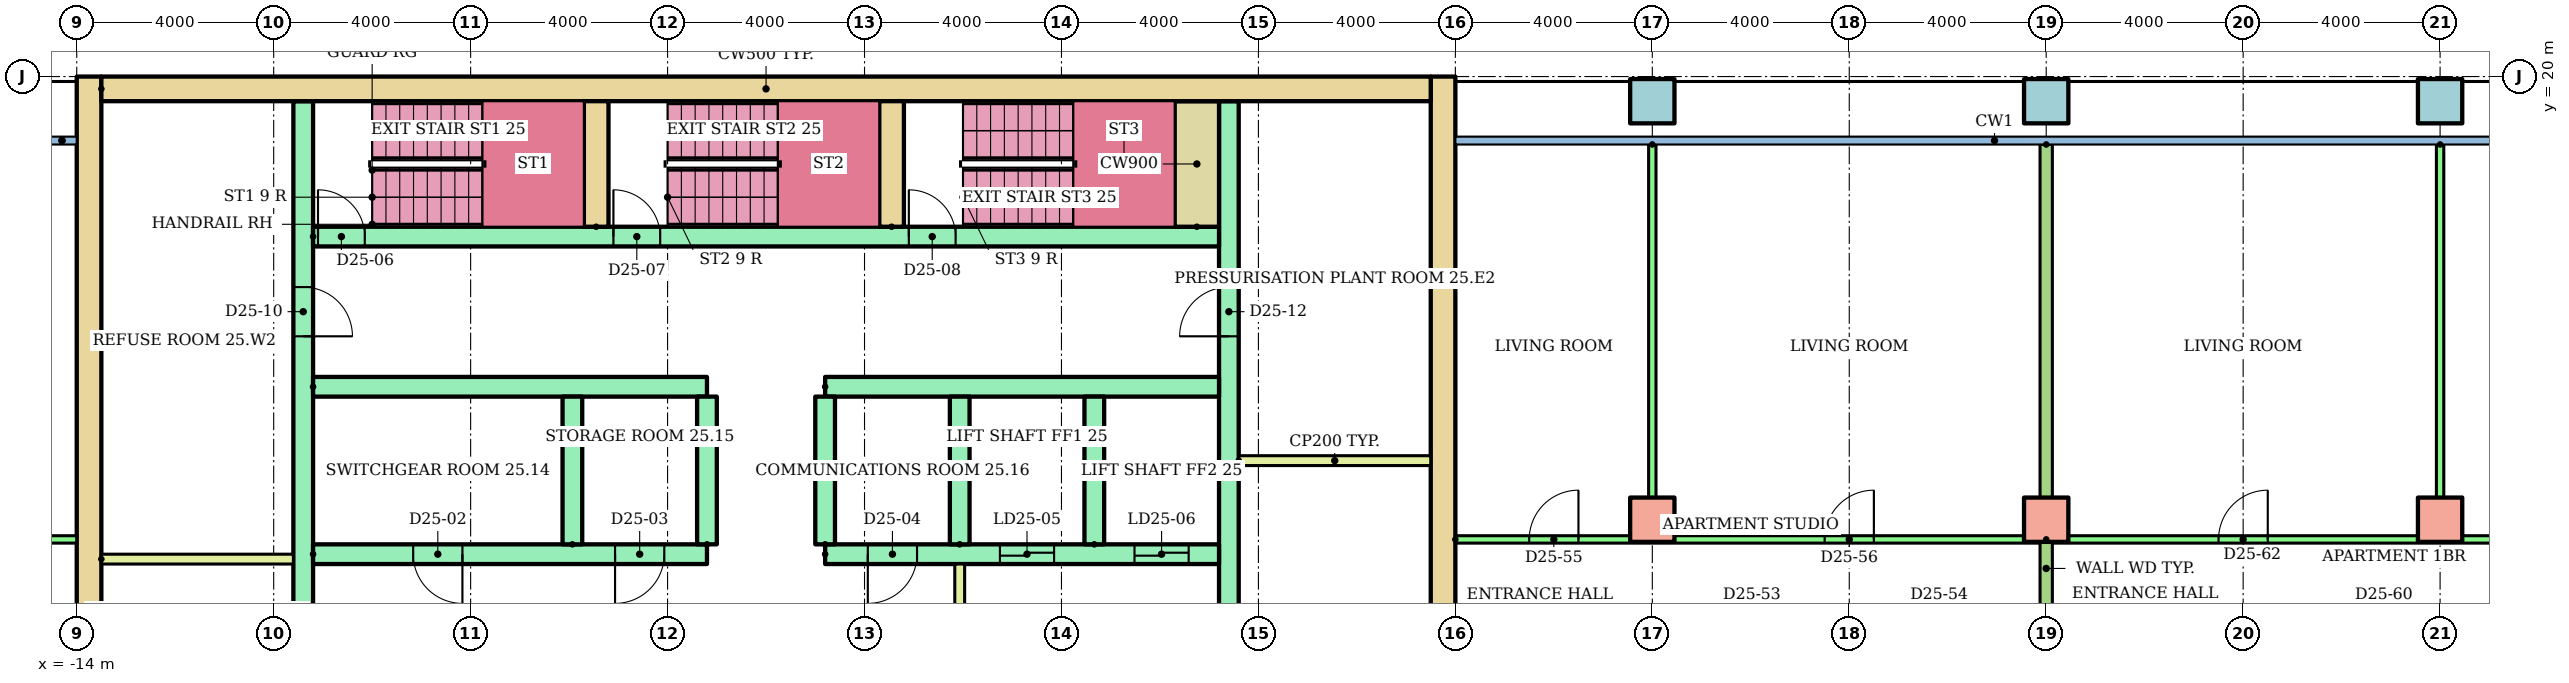
"""IFC4 building model, lengths in metres.
Left out: names, types, materials, properties, quantities, classifications, styles, units other than length and angle.
Written with IfcOpenShell. Run it as: python <this file> out.ifc"""

import sys

from ifc_helpers import new_model, si_unit, direction, frame, frame_2d, origin, origin_2d, place, context, subcontext, project, spatial, rectangle, hollow_rectangle, extrude, element, fill, save


model = new_model("IFC4")
c1 = context("Model", 3, precision=1e-05, world=origin(), true_north=direction((0.0, 1.0)))
c2 = subcontext(c1, "Body", "Model", "MODEL_VIEW")
j1 = project(units=[si_unit("LENGTHUNIT", "METRE"), si_unit("PLANEANGLEUNIT", "RADIAN")], contexts=[c1])
p1 = place(None, origin())
s1 = spatial("IfcSite", under=j1, at=p1, CompositionType="ELEMENT")
p2 = place(p1, origin())
s2 = spatial("IfcBuilding", under=s1, at=p2, CompositionType="ELEMENT")
p3 = place(p2, frame((0.0, 0.0, 96.7)))
s3 = spatial("IfcBuildingStorey", under=s2, at=p3, CompositionType="ELEMENT", Elevation=96.7)
for number, where in (
    (1, (18.0, 11.0, 0.0)),
    (2, (26.0, 11.0, 0.0)),
    (3, (34.0, 11.0, 0.0)),
):
    element("IfcColumn", number, at=place(p3, frame(where)), inside=s3, PredefinedType="COLUMN", context=c2, shape_type="SweptSolid", body=[
        extrude(rectangle(XDim=0.9, YDim=0.9, at=origin_2d()), origin(), (0.0, 0.0, 1.0), 3.2),
    ])
for number, where in (
    (4, (18.0, 19.5, 0.0)),
    (5, (26.0, 19.5, 0.0)),
    (6, (34.0, 19.5, 0.0)),
):
    element("IfcColumn", number, at=place(p3, frame(where)), inside=s3, PredefinedType="COLUMN", context=c2, shape_type="SweptSolid", body=[
        extrude(hollow_rectangle(XDim=0.9, YDim=0.9, WallThickness=0.045, at=origin_2d()), origin(), (0.0, 0.0, 1.0), 3.2),
    ])
for number, where, z_axis, x_axis in (
    (7, (-13.75, 3.0, 0.0), (0.0, 0.0, 1.0), (0.0, 1.0, 0.0)),
    (8, (13.75, 3.0, 0.0), (0.0, 0.0, 1.0), (0.0, 1.0, 0.0)),
):
    element("IfcWall", number, at=place(p3, frame(where, z_axis=z_axis, x_axis=x_axis)), inside=s3, PredefinedType="SHEAR", context=c2, shape_type="SweptSolid", body=[
        extrude(rectangle(XDim=17.0, YDim=0.5, at=frame_2d((8.5, 0.0))), origin(), (0.0, 0.0, 1.0), 2.92),
    ])
p4 = place(p3, frame((-13.5, 19.75, 0.0)))
e9 = element("IfcWall", 9, at=p4, inside=s3, PredefinedType="SHEAR", context=c2, shape_type="SweptSolid", body=[
    extrude(rectangle(XDim=27.0, YDim=0.5, at=frame_2d((13.5, 0.0))), origin(), (0.0, 0.0, 1.0), 2.92),
])
p5 = place(p3, frame((-9.4, 6.8, 0.0), z_axis=(0.0, 0.0, 1.0), x_axis=(0.0, 1.0, 0.0)))
e10 = element("IfcWall", 10, at=p5, inside=s3, PredefinedType="SHEAR", context=c2, shape_type="SweptSolid", body=[
    extrude(rectangle(XDim=12.7, YDim=0.4, at=frame_2d((6.35, 0.0))), origin(), (0.0, 0.0, 1.0), 2.92),
])
p6 = place(p5, frame((1.15, 0.0, 0.0)))
e11 = element("IfcOpeningElement", 11, at=p6, cuts=e10, PredefinedType="OPENING", context=c2, shape_type="SweptSolid", body=[
    extrude(rectangle(XDim=1.0, YDim=2.1, at=frame_2d((0.5, 1.05))), frame((0.0, 0.21, 0.0), z_axis=(0.0, -1.0, 0.0), x_axis=(1.0, 0.0, 0.0)), (0.0, 0.0, 1.0), 0.42),
])
p7 = place(p5, frame((7.925, 0.0, 0.0)))
e12 = element("IfcOpeningElement", 12, at=p7, cuts=e10, PredefinedType="OPENING", context=c2, shape_type="SweptSolid", body=[
    extrude(rectangle(XDim=1.0, YDim=2.1, at=frame_2d((0.5, 1.05))), frame((0.0, 0.21, 0.0), z_axis=(0.0, -1.0, 0.0), x_axis=(1.0, 0.0, 0.0)), (0.0, 0.0, 1.0), 0.42),
])
p8 = place(p3, frame((9.4, 6.8, 0.0), z_axis=(0.0, 0.0, 1.0), x_axis=(0.0, 1.0, 0.0)))
e13 = element("IfcWall", 13, at=p8, inside=s3, PredefinedType="SHEAR", context=c2, shape_type="SweptSolid", body=[
    extrude(rectangle(XDim=12.7, YDim=0.4, at=frame_2d((6.35, 0.0))), origin(), (0.0, 0.0, 1.0), 2.92),
])
p9 = place(p8, frame((1.15, 0.0, 0.0)))
e14 = element("IfcOpeningElement", 14, at=p9, cuts=e13, PredefinedType="OPENING", context=c2, shape_type="SweptSolid", body=[
    extrude(rectangle(XDim=1.0, YDim=2.1, at=frame_2d((0.5, 1.05))), frame((0.0, 0.21, 0.0), z_axis=(0.0, -1.0, 0.0), x_axis=(1.0, 0.0, 0.0)), (0.0, 0.0, 1.0), 0.42),
])
p10 = place(p8, frame((7.925, 0.0, 0.0)))
e15 = element("IfcOpeningElement", 15, at=p10, cuts=e13, PredefinedType="OPENING", context=c2, shape_type="SweptSolid", body=[
    extrude(rectangle(XDim=1.0, YDim=2.1, at=frame_2d((0.5, 1.05))), frame((0.0, 0.21, 0.0), z_axis=(0.0, -1.0, 0.0), x_axis=(1.0, 0.0, 0.0)), (0.0, 0.0, 1.0), 0.42),
])
p11 = place(p3, frame((-9.2, 10.3, 0.0)))
e16 = element("IfcWall", 16, at=p11, inside=s3, PredefinedType="SHEAR", context=c2, shape_type="SweptSolid", body=[
    extrude(rectangle(XDim=8.0, YDim=0.4, at=frame_2d((4.0, 0.0))), origin(), (0.0, 0.0, 1.0), 2.92),
])
p12 = place(p11, frame((2.033, 0.0, 0.0)))
e17 = element("IfcOpeningElement", 17, at=p12, cuts=e16, PredefinedType="OPENING", context=c2, shape_type="SweptSolid", body=[
    extrude(rectangle(XDim=1.0, YDim=2.1, at=frame_2d((0.5, 1.05))), frame((0.0, 0.21, 0.0), z_axis=(0.0, -1.0, 0.0), x_axis=(1.0, 0.0, 0.0)), (0.0, 0.0, 1.0), 0.42),
])
p13 = place(p11, frame((6.133, 0.0, 0.0)))
e18 = element("IfcOpeningElement", 18, at=p13, cuts=e16, PredefinedType="OPENING", context=c2, shape_type="SweptSolid", body=[
    extrude(rectangle(XDim=1.0, YDim=2.1, at=frame_2d((0.5, 1.05))), frame((0.0, 0.21, 0.0), z_axis=(0.0, -1.0, 0.0), x_axis=(1.0, 0.0, 0.0)), (0.0, 0.0, 1.0), 0.42),
])
p14 = place(p3, frame((-9.2, 13.7, 0.0)))
e19 = element("IfcWall", 19, at=p14, inside=s3, PredefinedType="SHEAR", context=c2, shape_type="SweptSolid", body=[
    extrude(rectangle(XDim=8.0, YDim=0.4, at=frame_2d((4.0, 0.0))), origin(), (0.0, 0.0, 1.0), 2.92),
])
p15 = place(p3, frame((1.2, 10.3, 0.0)))
e20 = element("IfcWall", 20, at=p15, inside=s3, PredefinedType="SHEAR", context=c2, shape_type="SweptSolid", body=[
    extrude(rectangle(XDim=8.0, YDim=0.4, at=frame_2d((4.0, 0.0))), origin(), (0.0, 0.0, 1.0), 2.92),
])
p16 = place(p15, frame((3.55, 0.0, 0.0)))
e21 = element("IfcOpeningElement", 21, at=p16, cuts=e20, PredefinedType="OPENING", context=c2, shape_type="SweptSolid", body=[
    extrude(rectangle(XDim=1.1, YDim=2.1, at=frame_2d((0.55, 1.05))), frame((0.0, 0.21, 0.0), z_axis=(0.0, -1.0, 0.0), x_axis=(1.0, 0.0, 0.0)), (0.0, 0.0, 1.0), 0.42),
])
p17 = place(p15, frame((6.283, 0.0, 0.0)))
e22 = element("IfcOpeningElement", 22, at=p17, cuts=e20, PredefinedType="OPENING", context=c2, shape_type="SweptSolid", body=[
    extrude(rectangle(XDim=1.1, YDim=2.1, at=frame_2d((0.55, 1.05))), frame((0.0, 0.21, 0.0), z_axis=(0.0, -1.0, 0.0), x_axis=(1.0, 0.0, 0.0)), (0.0, 0.0, 1.0), 0.42),
])
p18 = place(p15, frame((0.867, 0.0, 0.0)))
e23 = element("IfcOpeningElement", 23, at=p18, cuts=e20, PredefinedType="OPENING", context=c2, shape_type="SweptSolid", body=[
    extrude(rectangle(XDim=1.0, YDim=2.1, at=frame_2d((0.5, 1.05))), frame((0.0, 0.21, 0.0), z_axis=(0.0, -1.0, 0.0), x_axis=(1.0, 0.0, 0.0)), (0.0, 0.0, 1.0), 0.42),
])
p19 = place(p3, frame((1.2, 13.7, 0.0)))
e24 = element("IfcWall", 24, at=p19, inside=s3, PredefinedType="SHEAR", context=c2, shape_type="SweptSolid", body=[
    extrude(rectangle(XDim=8.0, YDim=0.4, at=frame_2d((4.0, 0.0))), origin(), (0.0, 0.0, 1.0), 2.92),
])
for number, where, z_axis, x_axis in (
    (25, (-3.933, 10.5, 0.0), (0.0, 0.0, 1.0), (0.0, 1.0, 0.0)),
    (26, (-1.2, 10.5, 0.0), (0.0, 0.0, 1.0), (0.0, 1.0, 0.0)),
    (27, (1.2, 10.5, 0.0), (0.0, 0.0, 1.0), (0.0, 1.0, 0.0)),
    (28, (3.933, 10.5, 0.0), (0.0, 0.0, 1.0), (0.0, 1.0, 0.0)),
    (29, (6.667, 10.5, 0.0), (0.0, 0.0, 1.0), (0.0, 1.0, 0.0)),
):
    element("IfcWall", number, at=place(p3, frame(where, z_axis=z_axis, x_axis=x_axis)), inside=s3, PredefinedType="SHEAR", context=c2, shape_type="SweptSolid", body=[
        extrude(rectangle(XDim=3.0, YDim=0.4, at=frame_2d((1.5, 0.0))), origin(), (0.0, 0.0, 1.0), 2.92),
    ])
p20 = place(p3, frame((3.933, 6.8, 0.0), z_axis=(0.0, 0.0, 1.0), x_axis=(0.0, 1.0, 0.0)))
e30 = element("IfcWall", 30, at=p20, inside=s3, PredefinedType="PARTITIONING", context=c2, shape_type="SweptSolid", body=[
    extrude(rectangle(XDim=3.3, YDim=0.2, at=frame_2d((1.65, 0.0))), origin(), (0.0, 0.0, 1.0), 2.92),
])
p21 = place(p20, frame((1.1, 0.0, 0.0)))
e31 = element("IfcOpeningElement", 31, at=p21, cuts=e30, PredefinedType="OPENING", context=c2, shape_type="SweptSolid", body=[
    extrude(rectangle(XDim=1.1, YDim=2.1, at=frame_2d((0.55, 1.05))), frame((0.0, 0.11, 0.0), z_axis=(0.0, -1.0, 0.0), x_axis=(1.0, 0.0, 0.0)), (0.0, 0.0, 1.0), 0.22),
])
p22 = place(p3, frame((-9.2, 16.75, 0.0)))
e32 = element("IfcWall", 32, at=p22, inside=s3, PredefinedType="SHEAR", context=c2, shape_type="SweptSolid", body=[
    extrude(rectangle(XDim=18.4, YDim=0.4, at=frame_2d((9.2, 0.0))), origin(), (0.0, 0.0, 1.0), 2.92),
])
p23 = place(p22, frame((0.1, 0.0, 0.0)))
e33 = element("IfcOpeningElement", 33, at=p23, cuts=e32, PredefinedType="OPENING", context=c2, shape_type="SweptSolid", body=[
    extrude(rectangle(XDim=0.95, YDim=2.1, at=frame_2d((0.475, 1.05))), frame((0.0, 0.21, 0.0), z_axis=(0.0, -1.0, 0.0), x_axis=(1.0, 0.0, 0.0)), (0.0, 0.0, 1.0), 0.42),
])
p24 = place(p22, frame((6.1, 0.0, 0.0)))
e34 = element("IfcOpeningElement", 34, at=p24, cuts=e32, PredefinedType="OPENING", context=c2, shape_type="SweptSolid", body=[
    extrude(rectangle(XDim=0.95, YDim=2.1, at=frame_2d((0.475, 1.05))), frame((0.0, 0.21, 0.0), z_axis=(0.0, -1.0, 0.0), x_axis=(1.0, 0.0, 0.0)), (0.0, 0.0, 1.0), 0.42),
])
p25 = place(p22, frame((12.1, 0.0, 0.0)))
e35 = element("IfcOpeningElement", 35, at=p25, cuts=e32, PredefinedType="OPENING", context=c2, shape_type="SweptSolid", body=[
    extrude(rectangle(XDim=0.95, YDim=2.1, at=frame_2d((0.475, 1.05))), frame((0.0, 0.21, 0.0), z_axis=(0.0, -1.0, 0.0), x_axis=(1.0, 0.0, 0.0)), (0.0, 0.0, 1.0), 0.42),
])
for number, where, z_axis, x_axis in (
    (36, (-3.45, 16.95, 0.0), (0.0, 0.0, 1.0), (0.0, 1.0, 0.0)),
    (37, (2.55, 16.95, 0.0), (0.0, 0.0, 1.0), (0.0, 1.0, 0.0)),
):
    element("IfcWall", number, at=place(p3, frame(where, z_axis=z_axis, x_axis=x_axis)), inside=s3, PredefinedType="SHEAR", context=c2, shape_type="SweptSolid", body=[
        extrude(rectangle(XDim=2.55, YDim=0.5, at=frame_2d((1.275, 0.0))), origin(), (0.0, 0.0, 1.0), 2.92),
    ])
p26 = place(p3, frame((8.75, 16.95, 0.0), z_axis=(0.0, 0.0, 1.0), x_axis=(0.0, 1.0, 0.0)))
e38 = element("IfcWall", 38, at=p26, inside=s3, PredefinedType="SHEAR", context=c2, shape_type="SweptSolid", body=[
    extrude(rectangle(XDim=2.55, YDim=0.9, at=frame_2d((1.275, 0.0))), origin(), (0.0, 0.0, 1.0), 2.92),
])
for number, where in (
    (39, (-13.5, 10.2, 0.0)),
    (40, (9.6, 12.2, 0.0)),
):
    element("IfcWall", number, at=place(p3, frame(where)), inside=s3, PredefinedType="PARTITIONING", context=c2, shape_type="SweptSolid", body=[
        extrude(rectangle(XDim=3.9, YDim=0.2, at=frame_2d((1.95, 0.0))), origin(), (0.0, 0.0, 1.0), 2.92),
    ])
p27 = place(p3, frame((-28.62, 10.6, 0.0)))
e41 = element("IfcWall", 41, at=p27, inside=s3, PredefinedType="PARTITIONING", context=c2, shape_type="SweptSolid", body=[
    extrude(rectangle(XDim=14.62, YDim=0.15, at=frame_2d((7.31, 0.0))), origin(), (0.0, 0.0, 1.0), 2.4),
])
p28 = place(p27, frame((1.97, 0.0, 0.0)))
e42 = element("IfcOpeningElement", 42, at=p28, cuts=e41, PredefinedType="OPENING", context=c2, shape_type="SweptSolid", body=[
    extrude(rectangle(XDim=1.0, YDim=2.1, at=frame_2d((0.5, 1.05))), frame((0.0, 0.085, 0.0), z_axis=(0.0, -1.0, 0.0), x_axis=(1.0, 0.0, 0.0)), (0.0, 0.0, 1.0), 0.17),
])
p29 = place(p27, frame((9.17, 0.0, 0.0)))
e43 = element("IfcOpeningElement", 43, at=p29, cuts=e41, PredefinedType="OPENING", context=c2, shape_type="SweptSolid", body=[
    extrude(rectangle(XDim=1.0, YDim=2.1, at=frame_2d((0.5, 1.05))), frame((0.0, 0.085, 0.0), z_axis=(0.0, -1.0, 0.0), x_axis=(1.0, 0.0, 0.0)), (0.0, 0.0, 1.0), 0.17),
])
p30 = place(p3, frame((14.0, 10.6, 0.0)))
e44 = element("IfcWall", 44, at=p30, inside=s3, PredefinedType="PARTITIONING", context=c2, shape_type="SweptSolid", body=[
    extrude(rectangle(XDim=12.0, YDim=0.15, at=frame_2d((6.0, 0.0))), origin(), (0.0, 0.0, 1.0), 2.4),
])
p31 = place(p30, frame((1.5, 0.0, 0.0)))
e45 = element("IfcOpeningElement", 45, at=p31, cuts=e44, PredefinedType="OPENING", context=c2, shape_type="SweptSolid", body=[
    extrude(rectangle(XDim=1.0, YDim=2.1, at=frame_2d((0.5, 1.05))), frame((0.0, 0.085, 0.0), z_axis=(0.0, -1.0, 0.0), x_axis=(1.0, 0.0, 0.0)), (0.0, 0.0, 1.0), 0.17),
])
p32 = place(p30, frame((7.5, 0.0, 0.0)))
e46 = element("IfcOpeningElement", 46, at=p32, cuts=e44, PredefinedType="OPENING", context=c2, shape_type="SweptSolid", body=[
    extrude(rectangle(XDim=1.0, YDim=2.1, at=frame_2d((0.5, 1.05))), frame((0.0, 0.085, 0.0), z_axis=(0.0, -1.0, 0.0), x_axis=(1.0, 0.0, 0.0)), (0.0, 0.0, 1.0), 0.17),
])
p33 = place(p3, frame((18.0, 18.621, 0.0), z_axis=(0.0, 0.0, 1.0), x_axis=(0.0, -1.0, 0.0)))
e47 = element("IfcWall", 47, at=p33, inside=s3, PredefinedType="PARTITIONING", context=c2, shape_type="SweptSolid", body=[
    extrude(rectangle(XDim=8.021, YDim=0.15, at=frame_2d((4.01, 0.0))), origin(), (0.0, 0.0, 1.0), 2.4),
])
p34 = place(p3, frame((26.0, 10.6, 0.0)))
e48 = element("IfcWall", 48, at=p34, inside=s3, PredefinedType="PARTITIONING", context=c2, shape_type="SweptSolid", body=[
    extrude(rectangle(XDim=14.61, YDim=0.15, at=frame_2d((7.305, 0.0))), origin(), (0.0, 0.0, 1.0), 2.4),
])
p35 = place(p34, frame((3.5, 0.0, 0.0)))
e49 = element("IfcOpeningElement", 49, at=p35, cuts=e48, PredefinedType="OPENING", context=c2, shape_type="SweptSolid", body=[
    extrude(rectangle(XDim=1.0, YDim=2.1, at=frame_2d((0.5, 1.05))), frame((0.0, 0.085, 0.0), z_axis=(0.0, -1.0, 0.0), x_axis=(1.0, 0.0, 0.0)), (0.0, 0.0, 1.0), 0.17),
])
p36 = place(p34, frame((10.75, 0.0, 0.0)))
e50 = element("IfcOpeningElement", 50, at=p36, cuts=e48, PredefinedType="OPENING", context=c2, shape_type="SweptSolid", body=[
    extrude(rectangle(XDim=0.9, YDim=2.1, at=frame_2d((0.45, 1.05))), frame((0.0, 0.085, 0.0), z_axis=(0.0, -1.0, 0.0), x_axis=(1.0, 0.0, 0.0)), (0.0, 0.0, 1.0), 0.17),
])
p37 = place(p3, frame((34.0, 18.621, 0.0), z_axis=(0.0, 0.0, 1.0), x_axis=(0.0, -1.0, 0.0)))
e51 = element("IfcWall", 51, at=p37, inside=s3, PredefinedType="PARTITIONING", context=c2, shape_type="SweptSolid", body=[
    extrude(rectangle(XDim=8.021, YDim=0.15, at=frame_2d((4.01, 0.0))), origin(), (0.0, 0.0, 1.0), 2.4),
])
p38 = place(p3, frame((26.0, 18.621, 0.0), z_axis=(0.0, 0.0, 1.0), x_axis=(0.0, -1.0, 0.0)))
e52 = element("IfcWall", 52, at=p38, inside=s3, PredefinedType="PARTITIONING", context=c2, shape_type="SweptSolid", body=[
    extrude(rectangle(XDim=17.221, YDim=0.25, at=frame_2d((8.611, 0.0))), origin(), (0.0, 0.0, 1.0), 2.4),
])
p39 = place(p16, origin())
e53 = element("IfcDoor", 53, at=p39, inside=s3, OperationType="SLIDING_TO_LEFT", PredefinedType="DOOR", context=c2, shape_type="SweptSolid", body=[
    extrude(rectangle(XDim=1.1, YDim=2.1, at=frame_2d((0.55, 1.05))), frame((0.0, 0.025, 0.0), z_axis=(0.0, -1.0, 0.0), x_axis=(1.0, 0.0, 0.0)), (0.0, 0.0, 1.0), 0.05),
])
fill(e21, e53)
p40 = place(p17, origin())
e54 = element("IfcDoor", 54, at=p40, inside=s3, OperationType="SLIDING_TO_LEFT", PredefinedType="DOOR", context=c2, shape_type="SweptSolid", body=[
    extrude(rectangle(XDim=1.1, YDim=2.1, at=frame_2d((0.55, 1.05))), frame((0.0, 0.025, 0.0), z_axis=(0.0, -1.0, 0.0), x_axis=(1.0, 0.0, 0.0)), (0.0, 0.0, 1.0), 0.05),
])
fill(e22, e54)
p41 = place(p12, frame((1.0, 0.0, 0.0), z_axis=(0.0, 0.0, 1.0), x_axis=(-1.0, 0.0, 0.0)))
e55 = element("IfcDoor", 55, at=p41, inside=s3, OperationType="SINGLE_SWING_RIGHT", PredefinedType="DOOR", context=c2, shape_type="SweptSolid", body=[
    extrude(rectangle(XDim=1.0, YDim=2.1, at=frame_2d((0.5, 1.05))), frame((0.0, 0.025, 0.0), z_axis=(0.0, -1.0, 0.0), x_axis=(1.0, 0.0, 0.0)), (0.0, 0.0, 1.0), 0.05),
])
fill(e17, e55)
p42 = place(p13, frame((1.0, 0.0, 0.0), z_axis=(0.0, 0.0, 1.0), x_axis=(-1.0, 0.0, 0.0)))
e56 = element("IfcDoor", 56, at=p42, inside=s3, OperationType="SINGLE_SWING_LEFT", PredefinedType="DOOR", context=c2, shape_type="SweptSolid", body=[
    extrude(rectangle(XDim=1.0, YDim=2.1, at=frame_2d((0.5, 1.05))), frame((0.0, 0.025, 0.0), z_axis=(0.0, -1.0, 0.0), x_axis=(1.0, 0.0, 0.0)), (0.0, 0.0, 1.0), 0.05),
])
fill(e18, e56)
p43 = place(p18, frame((1.0, 0.0, 0.0), z_axis=(0.0, 0.0, 1.0), x_axis=(-1.0, 0.0, 0.0)))
e57 = element("IfcDoor", 57, at=p43, inside=s3, OperationType="SINGLE_SWING_LEFT", PredefinedType="DOOR", context=c2, shape_type="SweptSolid", body=[
    extrude(rectangle(XDim=1.0, YDim=2.1, at=frame_2d((0.5, 1.05))), frame((0.0, 0.025, 0.0), z_axis=(0.0, -1.0, 0.0), x_axis=(1.0, 0.0, 0.0)), (0.0, 0.0, 1.0), 0.05),
])
fill(e23, e57)
p44 = place(p23, origin())
e58 = element("IfcDoor", 58, at=p44, inside=s3, OperationType="SINGLE_SWING_LEFT", PredefinedType="DOOR", context=c2, shape_type="SweptSolid", body=[
    extrude(rectangle(XDim=0.95, YDim=2.1, at=frame_2d((0.475, 1.05))), frame((0.0, 0.025, 0.0), z_axis=(0.0, -1.0, 0.0), x_axis=(1.0, 0.0, 0.0)), (0.0, 0.0, 1.0), 0.05),
])
fill(e33, e58)
p45 = place(p24, origin())
e59 = element("IfcDoor", 59, at=p45, inside=s3, OperationType="SINGLE_SWING_LEFT", PredefinedType="DOOR", context=c2, shape_type="SweptSolid", body=[
    extrude(rectangle(XDim=0.95, YDim=2.1, at=frame_2d((0.475, 1.05))), frame((0.0, 0.025, 0.0), z_axis=(0.0, -1.0, 0.0), x_axis=(1.0, 0.0, 0.0)), (0.0, 0.0, 1.0), 0.05),
])
fill(e34, e59)
p46 = place(p25, origin())
e60 = element("IfcDoor", 60, at=p46, inside=s3, OperationType="SINGLE_SWING_LEFT", PredefinedType="DOOR", context=c2, shape_type="SweptSolid", body=[
    extrude(rectangle(XDim=0.95, YDim=2.1, at=frame_2d((0.475, 1.05))), frame((0.0, 0.025, 0.0), z_axis=(0.0, -1.0, 0.0), x_axis=(1.0, 0.0, 0.0)), (0.0, 0.0, 1.0), 0.05),
])
fill(e35, e60)
p47 = place(p7, frame((1.0, 0.0, 0.0), z_axis=(0.0, 0.0, 1.0), x_axis=(-1.0, 0.0, 0.0)))
e61 = element("IfcDoor", 61, at=p47, inside=s3, OperationType="SINGLE_SWING_LEFT", PredefinedType="DOOR", context=c2, shape_type="SweptSolid", body=[
    extrude(rectangle(XDim=1.0, YDim=2.1, at=frame_2d((0.5, 1.05))), frame((0.0, 0.025, 0.0), z_axis=(0.0, -1.0, 0.0), x_axis=(1.0, 0.0, 0.0)), (0.0, 0.0, 1.0), 0.05),
])
fill(e12, e61)
p48 = place(p10, origin())
e62 = element("IfcDoor", 62, at=p48, inside=s3, OperationType="SINGLE_SWING_LEFT", PredefinedType="DOOR", context=c2, shape_type="SweptSolid", body=[
    extrude(rectangle(XDim=1.0, YDim=2.1, at=frame_2d((0.5, 1.05))), frame((0.0, 0.025, 0.0), z_axis=(0.0, -1.0, 0.0), x_axis=(1.0, 0.0, 0.0)), (0.0, 0.0, 1.0), 0.05),
])
fill(e15, e62)
p49 = place(p31, origin())
e63 = element("IfcDoor", 63, at=p49, inside=s3, OperationType="SINGLE_SWING_RIGHT", PredefinedType="DOOR", context=c2, shape_type="SweptSolid", body=[
    extrude(rectangle(XDim=1.0, YDim=2.1, at=frame_2d((0.5, 1.05))), frame((0.0, 0.025, 0.0), z_axis=(0.0, -1.0, 0.0), x_axis=(1.0, 0.0, 0.0)), (0.0, 0.0, 1.0), 0.05),
])
fill(e45, e63)
p50 = place(p32, origin())
e64 = element("IfcDoor", 64, at=p50, inside=s3, OperationType="SINGLE_SWING_RIGHT", PredefinedType="DOOR", context=c2, shape_type="SweptSolid", body=[
    extrude(rectangle(XDim=1.0, YDim=2.1, at=frame_2d((0.5, 1.05))), frame((0.0, 0.025, 0.0), z_axis=(0.0, -1.0, 0.0), x_axis=(1.0, 0.0, 0.0)), (0.0, 0.0, 1.0), 0.05),
])
fill(e46, e64)
p51 = place(p35, origin())
e65 = element("IfcDoor", 65, at=p51, inside=s3, OperationType="SINGLE_SWING_RIGHT", PredefinedType="DOOR", context=c2, shape_type="SweptSolid", body=[
    extrude(rectangle(XDim=1.0, YDim=2.1, at=frame_2d((0.5, 1.05))), frame((0.0, 0.025, 0.0), z_axis=(0.0, -1.0, 0.0), x_axis=(1.0, 0.0, 0.0)), (0.0, 0.0, 1.0), 0.05),
])
fill(e49, e65)
save(model, sys.argv[1])
